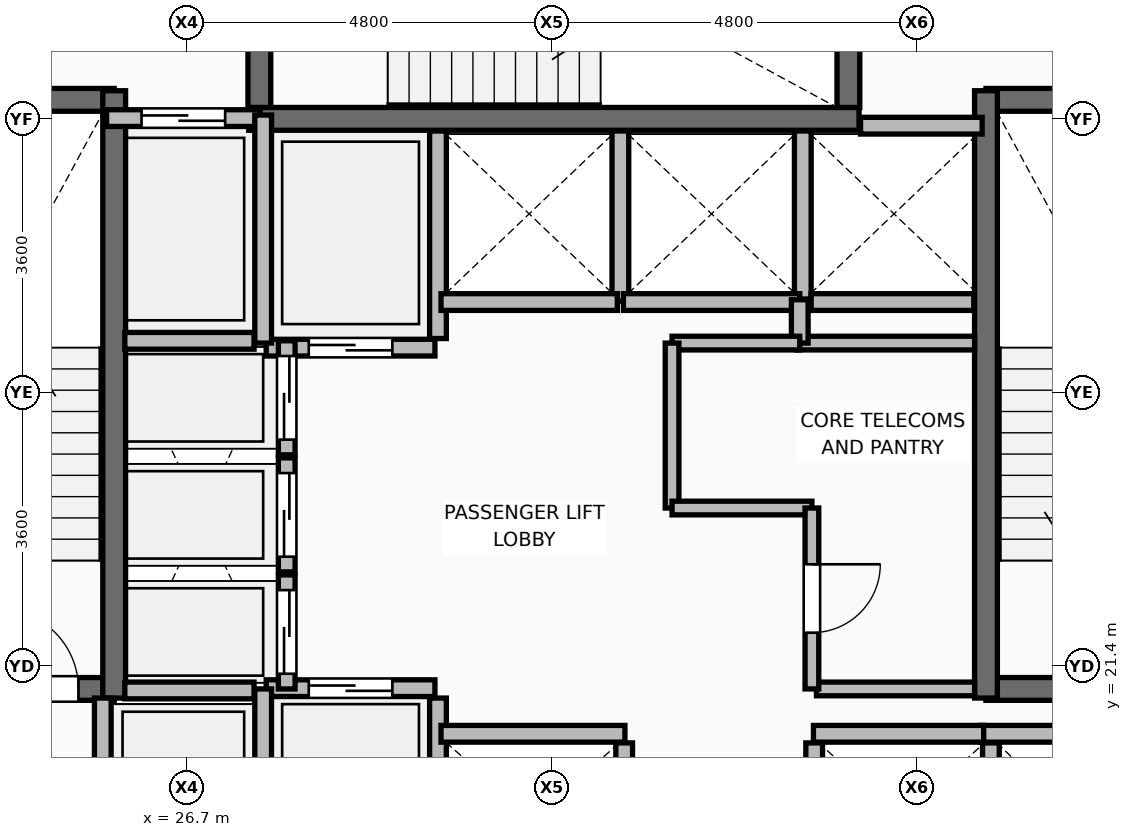
"""IFC4 building model, lengths in metres.
Left out: names, types, materials, properties, quantities, classifications, styles, units other than length and angle.
Written with IfcOpenShell. Run it as: python <this file> out.ifc"""

import sys

from ifc_helpers import new_model, si_unit, direction, frame, frame_2d, origin, place, context, subcontext, project, spatial, rectangle, extrude, element, fill, save


model = new_model("IFC4")
c1 = context("Model", 3, precision=1e-05, world=origin(), true_north=direction((0.0, 1.0)))
c2 = subcontext(c1, "Body", "Model", "MODEL_VIEW")
j1 = project(units=[si_unit("LENGTHUNIT", "METRE"), si_unit("PLANEANGLEUNIT", "RADIAN")], contexts=[c1])
p1 = place(None, origin())
s1 = spatial("IfcSite", under=j1, at=p1, CompositionType="ELEMENT")
p2 = place(p1, origin())
s2 = spatial("IfcBuilding", under=s1, at=p2, CompositionType="ELEMENT")
p3 = place(p2, frame((0.0, 0.0, 83.25)))
s3 = spatial("IfcBuildingStorey", under=s2, at=p3, CompositionType="ELEMENT", Elevation=83.25)
p4 = place(p3, frame((30.0, 18.08, 0.0), z_axis=(0.0, 0.0, 1.0), x_axis=(0.0, 1.0, 0.0)))
e1 = element("IfcWall", 1, at=p4, inside=s3, PredefinedType="PARTITIONING", context=c2, shape_type="SweptSolid", body=[
    extrude(rectangle(XDim=2.9, YDim=0.22, at=frame_2d((1.45, 0.0))), origin(), (0.0, 0.0, 1.0), 3.545),
])
for number, where, z_axis, x_axis in (
    (2, (32.45, 17.92, 0.0), (0.0, 0.0, 1.0), (0.0, 1.0, 0.0)),
    (3, (34.95, 17.92, 0.0), (0.0, 0.0, 1.0), (0.0, 1.0, 0.0)),
):
    element("IfcWall", number, at=place(p3, frame(where, z_axis=z_axis, x_axis=x_axis)), inside=s3, PredefinedType="PARTITIONING", context=c2, shape_type="SweptSolid", body=[
        extrude(rectangle(XDim=2.47, YDim=0.22, at=frame_2d((1.235, 0.0))), origin(), (0.0, 0.0, 1.0), 2.928),
    ])
p5 = place(p3, frame((37.275, 18.08, 0.0), z_axis=(0.0, 0.0, 1.0), x_axis=(0.0, 1.0, 0.0)))
e4 = element("IfcWall", 4, at=p5, inside=s3, PredefinedType="PARTITIONING", context=c2, shape_type="SweptSolid", body=[
    extrude(rectangle(XDim=2.31, YDim=0.22, at=frame_2d((1.155, 0.0))), origin(), (0.0, 0.0, 1.0), 3.545),
])
p6 = place(p3, frame((30.0, 25.71, 0.0), z_axis=(0.0, 0.0, 1.0), x_axis=(0.0, 1.0, 0.0)))
e5 = element("IfcWall", 5, at=p6, inside=s3, PredefinedType="PARTITIONING", context=c2, shape_type="SweptSolid", body=[
    extrude(rectangle(XDim=2.73, YDim=0.22, at=frame_2d((1.365, 0.0))), origin(), (0.0, 0.0, 1.0), 3.545),
])
p7 = place(p3, frame((32.4, 26.2, 0.0), z_axis=(0.0, 0.0, 1.0), x_axis=(0.0, 1.0, 0.0)))
e6 = element("IfcWall", 6, at=p7, inside=s3, PredefinedType="PARTITIONING", context=c2, shape_type="SweptSolid", body=[
    extrude(rectangle(XDim=2.24, YDim=0.22, at=frame_2d((1.12, 0.0))), origin(), (0.0, 0.0, 1.0), 3.545),
])
p8 = place(p3, frame((34.8, 26.23, 0.0), z_axis=(0.0, 0.0, 1.0), x_axis=(0.0, 1.0, 0.0)))
e7 = element("IfcWall", 7, at=p8, inside=s3, PredefinedType="PARTITIONING", context=c2, shape_type="SweptSolid", body=[
    extrude(rectangle(XDim=2.21, YDim=0.22, at=frame_2d((1.105, 0.0))), origin(), (0.0, 0.0, 1.0), 3.545),
])
p9 = place(p3, frame((34.91, 26.19, 0.0), z_axis=(0.0, 0.0, 1.0), x_axis=(1.0, 0.0, 0.0)))
e8 = element("IfcWall", 8, at=p9, inside=s3, PredefinedType="PARTITIONING", context=c2, shape_type="SweptSolid", body=[
    extrude(rectangle(XDim=2.14, YDim=0.22, at=frame_2d((1.07, 0.0))), origin(), (0.0, 0.0, 1.0), 3.545),
])
p10 = place(p3, frame((22.225, 21.1, 0.0), z_axis=(0.0, 0.0, 1.0), x_axis=(1.0, 0.0, 0.0)))
e9 = element("IfcWall", 9, at=p10, inside=s3, PredefinedType="SHEAR", context=c2, shape_type="SweptSolid", body=[
    extrude(rectangle(XDim=3.515, YDim=0.3, at=frame_2d((1.757, 0.0))), origin(), (0.0, 0.0, 1.0), 3.57),
])
p11 = place(p10, frame((1.995, 0.0, 0.0)))
e10 = element("IfcOpeningElement", 10, at=p11, cuts=e9, PredefinedType="OPENING", context=c2, shape_type="SweptSolid", body=[
    extrude(rectangle(XDim=1.05, YDim=2.1, at=frame_2d((0.525, 1.05))), frame((0.0, 0.16, 0.0), z_axis=(0.0, -1.0, 0.0), x_axis=(1.0, 0.0, 0.0)), (0.0, 0.0, 1.0), 0.32),
])
p12 = place(p3, frame((22.225, 28.85, 0.0), z_axis=(0.0, 0.0, 1.0), x_axis=(1.0, 0.0, 0.0)))
e11 = element("IfcWall", 11, at=p12, inside=s3, PredefinedType="SHEAR", context=c2, shape_type="SweptSolid", body=[
    extrude(rectangle(XDim=3.515, YDim=0.3, at=frame_2d((1.757, 0.0))), origin(), (0.0, 0.0, 1.0), 3.57),
])
p13 = place(p3, frame((25.74, 20.98, 0.0), z_axis=(0.0, 0.0, 1.0), x_axis=(0.0, 1.0, 0.0)))
e12 = element("IfcWall", 12, at=p13, inside=s3, PredefinedType="SHEAR", context=c2, shape_type="SweptSolid", body=[
    extrude(rectangle(XDim=7.99, YDim=0.3, at=frame_2d((3.995, 0.0))), origin(), (0.0, 0.0, 1.0), 3.57),
])
for number, where, z_axis, x_axis in (
    (13, (37.21, 21.1, 0.0), (0.0, 0.0, 1.0), (1.0, 0.0, 0.0)),
    (14, (37.21, 28.85, 0.0), (0.0, 0.0, 1.0), (1.0, 0.0, 0.0)),
):
    element("IfcWall", number, at=place(p3, frame(where, z_axis=z_axis, x_axis=x_axis)), inside=s3, PredefinedType="SHEAR", context=c2, shape_type="SweptSolid", body=[
        extrude(rectangle(XDim=3.565, YDim=0.3, at=frame_2d((1.782, 0.0))), origin(), (0.0, 0.0, 1.0), 3.57),
    ])
p14 = place(p3, frame((37.21, 20.98, 0.0), z_axis=(0.0, 0.0, 1.0), x_axis=(0.0, 1.0, 0.0)))
e15 = element("IfcWall", 15, at=p14, inside=s3, PredefinedType="SHEAR", context=c2, shape_type="SweptSolid", body=[
    extrude(rectangle(XDim=7.99, YDim=0.3, at=frame_2d((3.995, 0.0))), origin(), (0.0, 0.0, 1.0), 3.57),
])
p15 = place(p3, frame((27.51, 28.6, 0.0), z_axis=(0.0, 0.0, 1.0), x_axis=(1.0, 0.0, 0.0)))
e16 = element("IfcWall", 16, at=p15, inside=s3, PredefinedType="SHEAR", context=c2, shape_type="SweptSolid", body=[
    extrude(rectangle(XDim=8.03, YDim=0.3, at=frame_2d((4.015, 0.0))), origin(), (0.0, 0.0, 1.0), 3.57),
])
p16 = place(p3, frame((27.65, 28.75, 0.0), z_axis=(0.0, 0.0, 1.0), x_axis=(0.0, 1.0, 0.0)))
e17 = element("IfcWall", 17, at=p16, inside=s3, PredefinedType="SHEAR", context=c2, shape_type="SweptSolid", body=[
    extrude(rectangle(XDim=3.375, YDim=0.3, at=frame_2d((1.688, 0.0))), origin(), (0.0, 0.0, 1.0), 3.57),
])
p17 = place(p16, frame((1.0, 0.0, 0.0)))
e18 = element("IfcOpeningElement", 18, at=p17, cuts=e17, PredefinedType="OPENING", context=c2, shape_type="SweptSolid", body=[
    extrude(rectangle(XDim=1.05, YDim=2.1, at=frame_2d((0.525, 1.05))), frame((0.0, 0.16, 0.0), z_axis=(0.0, -1.0, 0.0), x_axis=(1.0, 0.0, 0.0)), (0.0, 0.0, 1.0), 0.32),
])
p18 = place(p3, frame((35.4, 28.75, 0.0), z_axis=(0.0, 0.0, 1.0), x_axis=(0.0, 1.0, 0.0)))
e19 = element("IfcWall", 19, at=p18, inside=s3, PredefinedType="SHEAR", context=c2, shape_type="SweptSolid", body=[
    extrude(rectangle(XDim=3.375, YDim=0.3, at=frame_2d((1.688, 0.0))), origin(), (0.0, 0.0, 1.0), 3.57),
])
p19 = place(p3, frame((25.59, 18.22, 0.0), z_axis=(0.0, 0.0, 1.0), x_axis=(0.0, 1.0, 0.0)))
e20 = element("IfcWall", 20, at=p19, inside=s3, PredefinedType="PARTITIONING", context=c2, shape_type="SweptSolid", body=[
    extrude(rectangle(XDim=2.76, YDim=0.22, at=frame_2d((1.38, 0.0))), origin(), (0.0, 0.0, 1.0), 3.55),
])
p20 = place(p19, frame((0.83, 0.0, 0.0)))
e21 = element("IfcOpeningElement", 21, at=p20, cuts=e20, PredefinedType="OPENING", context=c2, shape_type="SweptSolid", body=[
    extrude(rectangle(XDim=1.1, YDim=2.2, at=frame_2d((0.55, 1.1))), frame((0.0, 0.12, 0.0), z_axis=(0.0, -1.0, 0.0), x_axis=(1.0, 0.0, 0.0)), (0.0, 0.0, 1.0), 0.24),
])
p21 = place(p3, frame((25.64, 28.61, 0.0), z_axis=(0.0, 0.0, 1.0), x_axis=(1.0, 0.0, 0.0)))
e22 = element("IfcWall", 22, at=p21, inside=s3, PredefinedType="PARTITIONING", context=c2, shape_type="SweptSolid", body=[
    extrude(rectangle(XDim=2.02, YDim=0.22, at=frame_2d((1.01, 0.0))), origin(), (0.0, 0.0, 1.0), 3.55),
])
p22 = place(p21, frame((0.46, 0.0, 0.0)))
e23 = element("IfcOpeningElement", 23, at=p22, cuts=e22, PredefinedType="OPENING", context=c2, shape_type="SweptSolid", body=[
    extrude(rectangle(XDim=1.1, YDim=2.2, at=frame_2d((0.55, 1.1))), frame((0.0, 0.12, 0.0), z_axis=(0.0, -1.0, 0.0), x_axis=(1.0, 0.0, 0.0)), (0.0, 0.0, 1.0), 0.24),
])
p23 = place(p3, frame((27.74, 21.11, 0.0), z_axis=(0.0, 0.0, 1.0), x_axis=(1.0, 0.0, 0.0)))
e24 = element("IfcWall", 24, at=p23, inside=s3, PredefinedType="PARTITIONING", context=c2, shape_type="SweptSolid", body=[
    extrude(rectangle(XDim=2.22, YDim=0.22, at=frame_2d((1.11, 0.0))), origin(), (0.0, 0.0, 1.0), 3.55),
])
p24 = place(p23, frame((0.56, 0.0, 0.0)))
e25 = element("IfcOpeningElement", 25, at=p24, cuts=e24, PredefinedType="OPENING", context=c2, shape_type="SweptSolid", body=[
    extrude(rectangle(XDim=1.1, YDim=2.2, at=frame_2d((0.55, 1.1))), frame((0.0, 0.12, 0.0), z_axis=(0.0, -1.0, 0.0), x_axis=(1.0, 0.0, 0.0)), (0.0, 0.0, 1.0), 0.24),
])
p25 = place(p3, frame((27.74, 25.59, 0.0), z_axis=(0.0, 0.0, 1.0), x_axis=(1.0, 0.0, 0.0)))
e26 = element("IfcWall", 26, at=p25, inside=s3, PredefinedType="PARTITIONING", context=c2, shape_type="SweptSolid", body=[
    extrude(rectangle(XDim=2.22, YDim=0.22, at=frame_2d((1.11, 0.0))), origin(), (0.0, 0.0, 1.0), 3.55),
])
p26 = place(p25, frame((0.56, 0.0, 0.0)))
e27 = element("IfcOpeningElement", 27, at=p26, cuts=e26, PredefinedType="OPENING", context=c2, shape_type="SweptSolid", body=[
    extrude(rectangle(XDim=1.1, YDim=2.2, at=frame_2d((0.55, 1.1))), frame((0.0, 0.12, 0.0), z_axis=(0.0, -1.0, 0.0), x_axis=(1.0, 0.0, 0.0)), (0.0, 0.0, 1.0), 0.24),
])
p27 = place(p3, frame((30.04, 20.51, 0.0), z_axis=(0.0, 0.0, 1.0), x_axis=(1.0, 0.0, 0.0)))
e28 = element("IfcWall", 28, at=p27, inside=s3, PredefinedType="PARTITIONING", context=c2, shape_type="SweptSolid", body=[
    extrude(rectangle(XDim=2.42, YDim=0.22, at=frame_2d((1.21, 0.0))), origin(), (0.0, 0.0, 1.0), 3.55),
])
for number, where, z_axis, x_axis in (
    (29, (37.14, 20.51, 0.0), (0.0, 0.0, 1.0), (1.0, 0.0, 0.0)),
    (30, (34.94, 20.51, 0.0), (0.0, 0.0, 1.0), (1.0, 0.0, 0.0)),
):
    element("IfcWall", number, at=place(p3, frame(where, z_axis=z_axis, x_axis=x_axis)), inside=s3, PredefinedType="PARTITIONING", context=c2, shape_type="SweptSolid", body=[
        extrude(rectangle(XDim=2.24, YDim=0.22, at=frame_2d((1.12, 0.0))), origin(), (0.0, 0.0, 1.0), 3.55),
    ])
for number, where, z_axis, x_axis in (
    (31, (30.04, 26.19, 0.0), (0.0, 0.0, 1.0), (1.0, 0.0, 0.0)),
    (32, (32.44, 26.19, 0.0), (0.0, 0.0, 1.0), (1.0, 0.0, 0.0)),
):
    element("IfcWall", number, at=place(p3, frame(where, z_axis=z_axis, x_axis=x_axis)), inside=s3, PredefinedType="PARTITIONING", context=c2, shape_type="SweptSolid", body=[
        extrude(rectangle(XDim=2.32, YDim=0.22, at=frame_2d((1.16, 0.0))), origin(), (0.0, 0.0, 1.0), 3.55),
    ])
p28 = place(p3, frame((35.56, 28.51, 0.0), z_axis=(0.0, 0.0, 1.0), x_axis=(1.0, 0.0, 0.0)))
e33 = element("IfcWall", 33, at=p28, inside=s3, PredefinedType="PARTITIONING", context=c2, shape_type="SweptSolid", body=[
    extrude(rectangle(XDim=1.6, YDim=0.22, at=frame_2d((0.8, 0.0))), origin(), (0.0, 0.0, 1.0), 3.55),
])
p29 = place(p3, frame((28.01, 21.1, 0.0), z_axis=(0.0, 0.0, 1.0), x_axis=(0.0, 1.0, 0.0)))
e34 = element("IfcWall", 34, at=p29, inside=s3, PredefinedType="PARTITIONING", context=c2, shape_type="SweptSolid", body=[
    extrude(rectangle(XDim=1.5, YDim=0.22, at=frame_2d((0.75, 0.0))), origin(), (0.0, 0.0, 1.0), 3.55),
])
p30 = place(p29, frame((0.2, 0.0, 0.0)))
e35 = element("IfcOpeningElement", 35, at=p30, cuts=e34, PredefinedType="OPENING", context=c2, shape_type="SweptSolid", body=[
    extrude(rectangle(XDim=1.1, YDim=2.2, at=frame_2d((0.55, 1.1))), frame((0.0, 0.12, 0.0), z_axis=(0.0, -1.0, 0.0), x_axis=(1.0, 0.0, 0.0)), (0.0, 0.0, 1.0), 0.24),
])
p31 = place(p3, frame((28.01, 22.64, 0.0), z_axis=(0.0, 0.0, 1.0), x_axis=(0.0, 1.0, 0.0)))
e36 = element("IfcWall", 36, at=p31, inside=s3, PredefinedType="PARTITIONING", context=c2, shape_type="SweptSolid", body=[
    extrude(rectangle(XDim=1.5, YDim=0.22, at=frame_2d((0.75, 0.0))), origin(), (0.0, 0.0, 1.0), 3.55),
])
p32 = place(p31, frame((0.2, 0.0, 0.0)))
e37 = element("IfcOpeningElement", 37, at=p32, cuts=e36, PredefinedType="OPENING", context=c2, shape_type="SweptSolid", body=[
    extrude(rectangle(XDim=1.1, YDim=2.2, at=frame_2d((0.55, 1.1))), frame((0.0, 0.12, 0.0), z_axis=(0.0, -1.0, 0.0), x_axis=(1.0, 0.0, 0.0)), (0.0, 0.0, 1.0), 0.24),
])
p33 = place(p3, frame((28.01, 24.18, 0.0), z_axis=(0.0, 0.0, 1.0), x_axis=(0.0, 1.0, 0.0)))
e38 = element("IfcWall", 38, at=p33, inside=s3, PredefinedType="PARTITIONING", context=c2, shape_type="SweptSolid", body=[
    extrude(rectangle(XDim=1.5, YDim=0.22, at=frame_2d((0.75, 0.0))), origin(), (0.0, 0.0, 1.0), 3.55),
])
p34 = place(p33, frame((0.2, 0.0, 0.0)))
e39 = element("IfcOpeningElement", 39, at=p34, cuts=e38, PredefinedType="OPENING", context=c2, shape_type="SweptSolid", body=[
    extrude(rectangle(XDim=1.1, YDim=2.2, at=frame_2d((0.55, 1.1))), frame((0.0, 0.12, 0.0), z_axis=(0.0, -1.0, 0.0), x_axis=(1.0, 0.0, 0.0)), (0.0, 0.0, 1.0), 0.24),
])
p35 = place(p3, frame((27.7, 18.15, 0.0), z_axis=(0.0, 0.0, 1.0), x_axis=(0.0, 1.0, 0.0)))
e40 = element("IfcWall", 40, at=p35, inside=s3, PredefinedType="PARTITIONING", context=c2, shape_type="SweptSolid", body=[
    extrude(rectangle(XDim=2.95, YDim=0.22, at=frame_2d((1.475, 0.0))), origin(), (0.0, 0.0, 1.0), 3.55),
])
p36 = place(p3, frame((27.7, 25.65, 0.0), z_axis=(0.0, 0.0, 1.0), x_axis=(0.0, 1.0, 0.0)))
e41 = element("IfcWall", 41, at=p36, inside=s3, PredefinedType="PARTITIONING", context=c2, shape_type="SweptSolid", body=[
    extrude(rectangle(XDim=3.0, YDim=0.22, at=frame_2d((1.5, 0.0))), origin(), (0.0, 0.0, 1.0), 3.55),
])
for number, where, z_axis, x_axis in (
    (42, (25.88, 21.08, 0.0), (0.0, 0.0, 1.0), (1.0, 0.0, 0.0)),
    (43, (25.88, 25.68, 0.0), (0.0, 0.0, 1.0), (1.0, 0.0, 0.0)),
):
    element("IfcWall", number, at=place(p3, frame(where, z_axis=z_axis, x_axis=x_axis)), inside=s3, PredefinedType="PARTITIONING", context=c2, shape_type="SweptSolid", body=[
        extrude(rectangle(XDim=1.7, YDim=0.22, at=frame_2d((0.85, 0.0))), origin(), (0.0, 0.0, 1.0), 3.55),
    ])
p37 = place(p3, frame((34.98, 21.1, 0.0), z_axis=(0.0, 0.0, 1.0), x_axis=(1.0, 0.0, 0.0)))
e44 = element("IfcWall", 44, at=p37, inside=s3, PredefinedType="PARTITIONING", context=c2, shape_type="SweptSolid", body=[
    extrude(rectangle(XDim=2.08, YDim=0.18, at=frame_2d((1.04, 0.0))), origin(), (0.0, 0.0, 1.0), 3.55),
])
p38 = place(p3, frame((34.72, 25.65, 0.0), z_axis=(0.0, 0.0, 1.0), x_axis=(1.0, 0.0, 0.0)))
e45 = element("IfcWall", 45, at=p38, inside=s3, PredefinedType="PARTITIONING", context=c2, shape_type="SweptSolid", body=[
    extrude(rectangle(XDim=2.34, YDim=0.18, at=frame_2d((1.17, 0.0))), origin(), (0.0, 0.0, 1.0), 3.55),
])
p39 = place(p3, frame((34.76, 25.65, 0.0), z_axis=(0.0, 0.0, 1.0), x_axis=(0.0, 1.0, 0.0)))
e46 = element("IfcWall", 46, at=p39, inside=s3, PredefinedType="PARTITIONING", context=c2, shape_type="SweptSolid", body=[
    extrude(rectangle(XDim=0.57, YDim=0.22, at=frame_2d((0.285, 0.0))), origin(), (0.0, 0.0, 1.0), 3.55),
])
p40 = place(p3, frame((33.08, 25.65, 0.0), z_axis=(0.0, 0.0, 1.0), x_axis=(1.0, 0.0, 0.0)))
e47 = element("IfcWall", 47, at=p40, inside=s3, PredefinedType="PARTITIONING", context=c2, shape_type="SweptSolid", body=[
    extrude(rectangle(XDim=1.68, YDim=0.18, at=frame_2d((0.84, 0.0))), origin(), (0.0, 0.0, 1.0), 3.55),
])
p41 = place(p3, frame((33.08, 23.48, 0.0), z_axis=(0.0, 0.0, 1.0), x_axis=(0.0, 1.0, 0.0)))
e48 = element("IfcWall", 48, at=p41, inside=s3, PredefinedType="PARTITIONING", context=c2, shape_type="SweptSolid", body=[
    extrude(rectangle(XDim=2.17, YDim=0.18, at=frame_2d((1.085, 0.0))), origin(), (0.0, 0.0, 1.0), 3.55),
])
p42 = place(p3, frame((33.08, 23.48, 0.0), z_axis=(0.0, 0.0, 1.0), x_axis=(1.0, 0.0, 0.0)))
e49 = element("IfcWall", 49, at=p42, inside=s3, PredefinedType="PARTITIONING", context=c2, shape_type="SweptSolid", body=[
    extrude(rectangle(XDim=1.84, YDim=0.18, at=frame_2d((0.92, 0.0))), origin(), (0.0, 0.0, 1.0), 3.55),
])
p43 = place(p3, frame((34.92, 21.1, 0.0), z_axis=(0.0, 0.0, 1.0), x_axis=(0.0, 1.0, 0.0)))
e50 = element("IfcWall", 50, at=p43, inside=s3, PredefinedType="PARTITIONING", context=c2, shape_type="SweptSolid", body=[
    extrude(rectangle(XDim=2.38, YDim=0.18, at=frame_2d((1.19, 0.0))), origin(), (0.0, 0.0, 1.0), 3.55),
])
p44 = place(p43, frame((0.74, 0.0, 0.0)))
e51 = element("IfcOpeningElement", 51, at=p44, cuts=e50, PredefinedType="OPENING", context=c2, shape_type="SweptSolid", body=[
    extrude(rectangle(XDim=0.9, YDim=2.1, at=frame_2d((0.45, 1.05))), frame((0.0, 0.1, 0.0), z_axis=(0.0, -1.0, 0.0), x_axis=(1.0, 0.0, 0.0)), (0.0, 0.0, 1.0), 0.2),
])
p45 = place(p11, origin())
e52 = element("IfcDoor", 52, at=p45, inside=s3, OperationType="SINGLE_SWING_LEFT", PredefinedType="DOOR", context=c2, shape_type="SweptSolid", body=[
    extrude(rectangle(XDim=1.05, YDim=2.1, at=frame_2d((0.525, 1.05))), frame((0.0, 0.025, 0.0), z_axis=(0.0, -1.0, 0.0), x_axis=(1.0, 0.0, 0.0)), (0.0, 0.0, 1.0), 0.05),
])
fill(e10, e52)
p46 = place(p22, origin())
e53 = element("IfcDoor", 53, at=p46, inside=s3, OperationType="DOUBLE_DOOR_SLIDING", PredefinedType="DOOR", context=c2, shape_type="SweptSolid", body=[
    extrude(rectangle(XDim=1.1, YDim=2.2, at=frame_2d((0.55, 1.1))), frame((0.0, 0.025, 0.0), z_axis=(0.0, -1.0, 0.0), x_axis=(1.0, 0.0, 0.0)), (0.0, 0.0, 1.0), 0.05),
])
fill(e23, e53)
p47 = place(p24, origin())
e54 = element("IfcDoor", 54, at=p47, inside=s3, OperationType="DOUBLE_DOOR_SLIDING", PredefinedType="DOOR", context=c2, shape_type="SweptSolid", body=[
    extrude(rectangle(XDim=1.1, YDim=2.2, at=frame_2d((0.55, 1.1))), frame((0.0, 0.025, 0.0), z_axis=(0.0, -1.0, 0.0), x_axis=(1.0, 0.0, 0.0)), (0.0, 0.0, 1.0), 0.05),
])
fill(e25, e54)
p48 = place(p26, frame((1.1, 0.0, 0.0), z_axis=(0.0, 0.0, 1.0), x_axis=(-1.0, 0.0, 0.0)))
e55 = element("IfcDoor", 55, at=p48, inside=s3, OperationType="DOUBLE_DOOR_SLIDING", PredefinedType="DOOR", context=c2, shape_type="SweptSolid", body=[
    extrude(rectangle(XDim=1.1, YDim=2.2, at=frame_2d((0.55, 1.1))), frame((0.0, 0.025, 0.0), z_axis=(0.0, -1.0, 0.0), x_axis=(1.0, 0.0, 0.0)), (0.0, 0.0, 1.0), 0.05),
])
fill(e27, e55)
p49 = place(p30, frame((1.1, 0.0, 0.0), z_axis=(0.0, 0.0, 1.0), x_axis=(-1.0, 0.0, 0.0)))
e56 = element("IfcDoor", 56, at=p49, inside=s3, OperationType="DOUBLE_DOOR_SLIDING", PredefinedType="DOOR", context=c2, shape_type="SweptSolid", body=[
    extrude(rectangle(XDim=1.1, YDim=2.2, at=frame_2d((0.55, 1.1))), frame((0.0, 0.025, 0.0), z_axis=(0.0, -1.0, 0.0), x_axis=(1.0, 0.0, 0.0)), (0.0, 0.0, 1.0), 0.05),
])
fill(e35, e56)
p50 = place(p32, frame((1.1, 0.0, 0.0), z_axis=(0.0, 0.0, 1.0), x_axis=(-1.0, 0.0, 0.0)))
e57 = element("IfcDoor", 57, at=p50, inside=s3, OperationType="DOUBLE_DOOR_SLIDING", PredefinedType="DOOR", context=c2, shape_type="SweptSolid", body=[
    extrude(rectangle(XDim=1.1, YDim=2.2, at=frame_2d((0.55, 1.1))), frame((0.0, 0.025, 0.0), z_axis=(0.0, -1.0, 0.0), x_axis=(1.0, 0.0, 0.0)), (0.0, 0.0, 1.0), 0.05),
])
fill(e37, e57)
p51 = place(p34, frame((1.1, 0.0, 0.0), z_axis=(0.0, 0.0, 1.0), x_axis=(-1.0, 0.0, 0.0)))
e58 = element("IfcDoor", 58, at=p51, inside=s3, OperationType="DOUBLE_DOOR_SLIDING", PredefinedType="DOOR", context=c2, shape_type="SweptSolid", body=[
    extrude(rectangle(XDim=1.1, YDim=2.2, at=frame_2d((0.55, 1.1))), frame((0.0, 0.025, 0.0), z_axis=(0.0, -1.0, 0.0), x_axis=(1.0, 0.0, 0.0)), (0.0, 0.0, 1.0), 0.05),
])
fill(e39, e58)
p52 = place(p44, frame((0.9, 0.0, 0.0), z_axis=(0.0, 0.0, 1.0), x_axis=(-1.0, 0.0, 0.0)))
e59 = element("IfcDoor", 59, at=p52, inside=s3, OperationType="SINGLE_SWING_LEFT", PredefinedType="DOOR", context=c2, shape_type="SweptSolid", body=[
    extrude(rectangle(XDim=0.9, YDim=2.1, at=frame_2d((0.45, 1.05))), frame((0.0, 0.025, 0.0), z_axis=(0.0, -1.0, 0.0), x_axis=(1.0, 0.0, 0.0)), (0.0, 0.0, 1.0), 0.05),
])
fill(e51, e59)
save(model, sys.argv[1])
